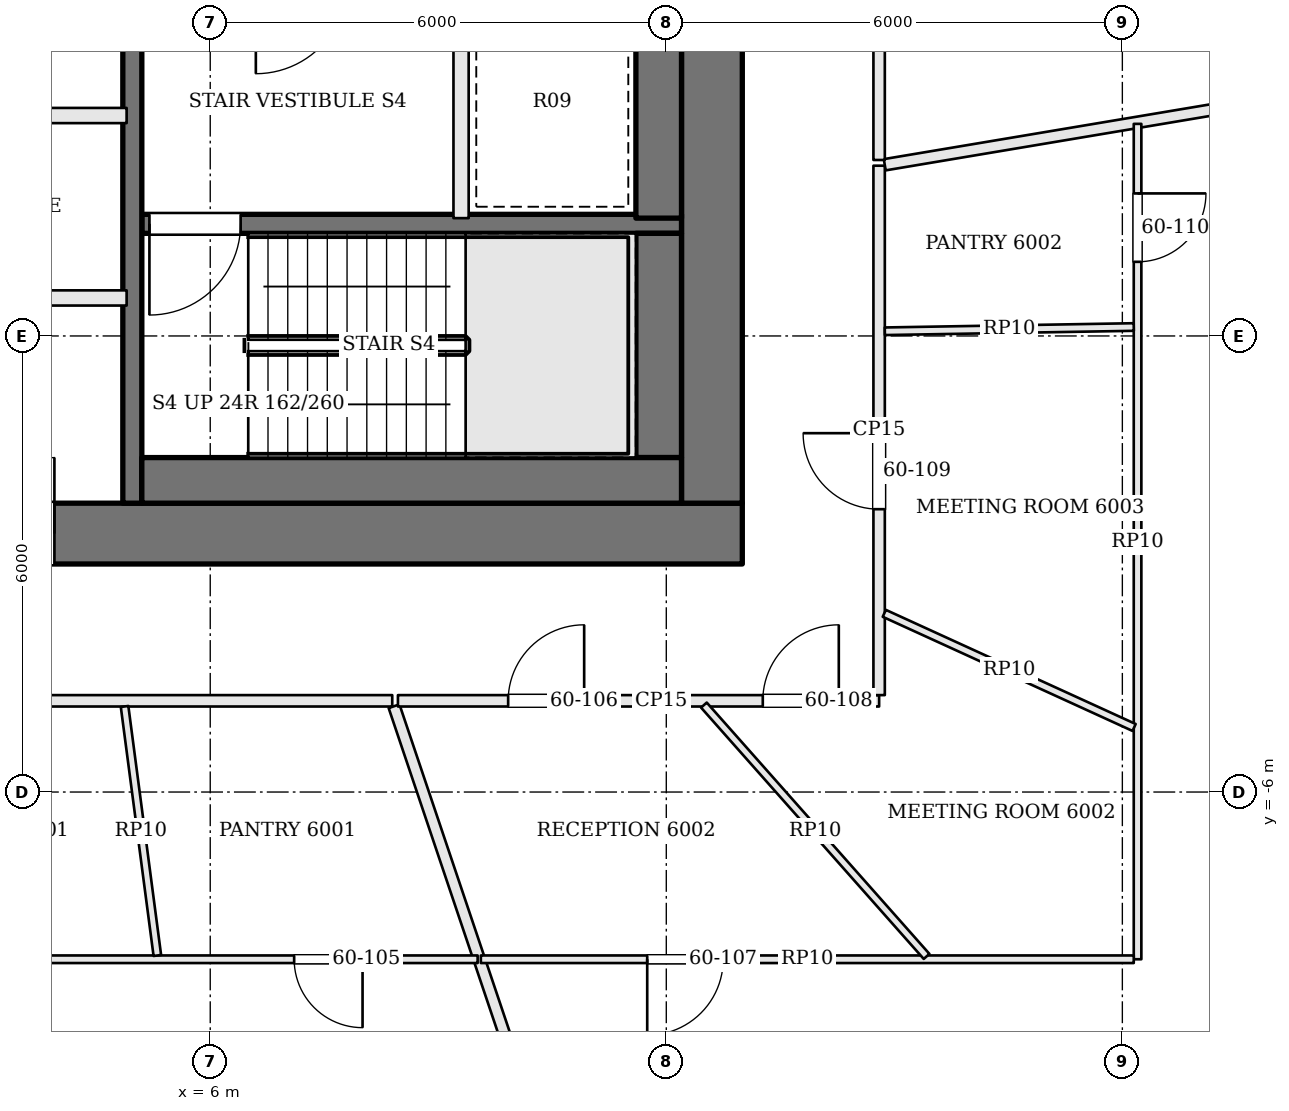
"""IFC4 building model, lengths in metres.
Left out: names, types, materials, properties, quantities, classifications, styles, units other than length and angle.
Written with IfcOpenShell. Run it as: python <this file> out.ifc"""

import sys

from ifc_helpers import new_model, si_unit, direction, frame, frame_2d, origin, place, context, subcontext, project, spatial, rectangle, extrude, element, fill, save


model = new_model("IFC4")
c1 = context("Model", 3, precision=1e-05, world=origin(), true_north=direction((0.0, 1.0)))
c2 = subcontext(c1, "Body", "Model", "MODEL_VIEW")
j1 = project(units=[si_unit("LENGTHUNIT", "METRE"), si_unit("PLANEANGLEUNIT", "RADIAN")], contexts=[c1])
p1 = place(None, origin())
s1 = spatial("IfcSite", under=j1, at=p1, CompositionType="ELEMENT")
p2 = place(p1, origin())
s2 = spatial("IfcBuilding", under=s1, at=p2, CompositionType="ELEMENT")
p3 = place(p2, frame((0.0, 0.0, 244.8)))
s3 = spatial("IfcBuildingStorey", under=s2, at=p3, CompositionType="ELEMENT", Elevation=244.8)
p4 = place(p3, frame((-13.0, -2.6, 0.0), z_axis=(0.0, 0.0, 1.0), x_axis=(1.0, 0.0, 0.0)))
e1 = element("IfcWall", 1, at=p4, inside=s3, PredefinedType="SHEAR", context=c2, shape_type="SweptSolid", body=[
    extrude(rectangle(XDim=26.0, YDim=0.8, at=frame_2d((13.0, 0.0))), origin(), (0.0, 0.0, 1.0), 3.9),
])
p5 = place(p4, frame((8.925, 0.0, 0.0)))
e2 = element("IfcOpeningElement", 2, at=p5, cuts=e1, PredefinedType="OPENING", context=c2, shape_type="SweptSolid", body=[
    extrude(rectangle(XDim=0.9, YDim=2.1, at=frame_2d((0.45, 1.05))), frame((0.0, 0.41, 0.0), z_axis=(0.0, -1.0, 0.0), x_axis=(1.0, 0.0, 0.0)), (0.0, 0.0, 1.0), 0.82),
])
p6 = place(p4, frame((11.475, 0.0, 0.0)))
e3 = element("IfcOpeningElement", 3, at=p6, cuts=e1, PredefinedType="OPENING", context=c2, shape_type="SweptSolid", body=[
    extrude(rectangle(XDim=0.9, YDim=2.1, at=frame_2d((0.45, 1.05))), frame((0.0, 0.41, 0.0), z_axis=(0.0, -1.0, 0.0), x_axis=(1.0, 0.0, 0.0)), (0.0, 0.0, 1.0), 0.82),
])
p7 = place(p4, frame((13.6, 0.0, 0.0)))
e4 = element("IfcOpeningElement", 4, at=p7, cuts=e1, PredefinedType="OPENING", context=c2, shape_type="SweptSolid", body=[
    extrude(rectangle(XDim=1.0, YDim=2.1, at=frame_2d((0.5, 1.05))), frame((0.0, 0.41, 0.0), z_axis=(0.0, -1.0, 0.0), x_axis=(1.0, 0.0, 0.0)), (0.0, 0.0, 1.0), 0.82),
])
p8 = place(p4, frame((15.95, 0.0, 0.0)))
e5 = element("IfcOpeningElement", 5, at=p8, cuts=e1, PredefinedType="OPENING", context=c2, shape_type="SweptSolid", body=[
    extrude(rectangle(XDim=1.0, YDim=2.1, at=frame_2d((0.5, 1.05))), frame((0.0, 0.41, 0.0), z_axis=(0.0, -1.0, 0.0), x_axis=(1.0, 0.0, 0.0)), (0.0, 0.0, 1.0), 0.82),
])
p9 = place(p3, frame((12.6, -2.2, 0.0), z_axis=(0.0, 0.0, 1.0), x_axis=(0.0, 1.0, 0.0)))
e6 = element("IfcWall", 6, at=p9, inside=s3, PredefinedType="SHEAR", context=c2, shape_type="SweptSolid", body=[
    extrude(rectangle(XDim=13.4, YDim=0.8, at=frame_2d((6.7, 0.0))), origin(), (0.0, 0.0, 1.0), 3.9),
])
p10 = place(p9, frame((7.4, 0.0, 0.0)))
e7 = element("IfcOpeningElement", 7, at=p10, cuts=e6, PredefinedType="OPENING", context=c2, shape_type="SweptSolid", body=[
    extrude(rectangle(XDim=1.8, YDim=2.1, at=frame_2d((0.9, 1.05))), frame((0.0, 0.41, 0.0), z_axis=(0.0, -1.0, 0.0), x_axis=(1.0, 0.0, 0.0)), (0.0, 0.0, 1.0), 0.82),
])
p11 = place(p3, frame((12.2, 1.475, 0.0), z_axis=(0.0, 0.0, 1.0), x_axis=(-1.0, 0.0, 0.0)))
e8 = element("IfcWall", 8, at=p11, inside=s3, PredefinedType="SOLIDWALL", context=c2, shape_type="SweptSolid", body=[
    extrude(rectangle(XDim=7.1, YDim=0.25, at=frame_2d((3.55, 0.0))), origin(), (0.0, 0.0, 1.0), 3.7),
])
p12 = place(p11, frame((5.8, 0.0, 0.0)))
e9 = element("IfcOpeningElement", 9, at=p12, cuts=e8, PredefinedType="OPENING", context=c2, shape_type="SweptSolid", body=[
    extrude(rectangle(XDim=1.2, YDim=2.1, at=frame_2d((0.6, 1.05))), frame((0.0, 0.135, 0.0), z_axis=(0.0, -1.0, 0.0), x_axis=(1.0, 0.0, 0.0)), (0.0, 0.0, 1.0), 0.27),
])
p13 = place(p3, frame((9.3, 4.55, 0.0), z_axis=(0.0, 0.0, 1.0), x_axis=(0.0, -1.0, 0.0)))
e10 = element("IfcWall", 10, at=p13, inside=s3, PredefinedType="SOLIDWALL", context=c2, shape_type="SweptSolid", body=[
    extrude(rectangle(XDim=3.0, YDim=0.2, at=frame_2d((1.5, 0.0))), origin(), (0.0, 0.0, 1.0), 3.7),
])
p14 = place(p3, frame((4.975, 11.2, 0.0), z_axis=(0.0, 0.0, 1.0), x_axis=(0.0, -1.0, 0.0)))
e11 = element("IfcWall", 11, at=p14, inside=s3, PredefinedType="SOLIDWALL", context=c2, shape_type="SweptSolid", body=[
    extrude(rectangle(XDim=13.4, YDim=0.25, at=frame_2d((6.7, 0.0))), origin(), (0.0, 0.0, 1.0), 3.7),
])
p15 = place(p14, frame((5.25, 0.0, 0.0)))
e12 = element("IfcOpeningElement", 12, at=p15, cuts=e11, PredefinedType="OPENING", context=c2, shape_type="SweptSolid", body=[
    extrude(rectangle(XDim=1.2, YDim=2.1, at=frame_2d((0.6, 1.05))), frame((0.0, 0.135, 0.0), z_axis=(0.0, -1.0, 0.0), x_axis=(1.0, 0.0, 0.0)), (0.0, 0.0, 1.0), 0.27),
])
p16 = place(p3, frame((11.9, 4.55, 0.0), z_axis=(0.0, 0.0, 1.0), x_axis=(0.0, -1.0, 0.0)))
e13 = element("IfcWall", 13, at=p16, inside=s3, PredefinedType="SOLIDWALL", context=c2, shape_type="SweptSolid", body=[
    extrude(rectangle(XDim=3.0, YDim=0.6, at=frame_2d((1.5, 0.0))), origin(), (0.0, 0.0, 1.0), 3.7),
])
p17 = place(p3, frame((11.9, 1.35, 0.0), z_axis=(0.0, 0.0, 1.0), x_axis=(0.0, -1.0, 0.0)))
e14 = element("IfcWall", 14, at=p17, inside=s3, PredefinedType="SOLIDWALL", context=c2, shape_type="SweptSolid", body=[
    extrude(rectangle(XDim=2.95, YDim=0.6, at=frame_2d((1.475, 0.0))), origin(), (0.0, 0.0, 1.0), 3.7),
])
p18 = place(p3, frame((12.2, -1.9, 0.0), z_axis=(0.0, 0.0, 1.0), x_axis=(-1.0, 0.0, 0.0)))
e15 = element("IfcWall", 15, at=p18, inside=s3, PredefinedType="SOLIDWALL", context=c2, shape_type="SweptSolid", body=[
    extrude(rectangle(XDim=7.1, YDim=0.6, at=frame_2d((3.55, 0.0))), origin(), (0.0, 0.0, 1.0), 3.7),
])
p19 = place(p3, frame((-4.9, 0.5, 0.0), z_axis=(0.0, 0.0, 1.0), x_axis=(1.0, 0.0, 0.0)))
e16 = element("IfcWall", 16, at=p19, inside=s3, PredefinedType="SOLIDWALL", context=c2, shape_type="SweptSolid", body=[
    extrude(rectangle(XDim=9.8, YDim=0.2, at=frame_2d((4.9, 0.0))), origin(), (0.0, 0.0, 1.0), 3.7),
])
p20 = place(p3, frame((-4.9, 2.9, 0.0), z_axis=(0.0, 0.0, 1.0), x_axis=(1.0, 0.0, 0.0)))
e17 = element("IfcWall", 17, at=p20, inside=s3, PredefinedType="SOLIDWALL", context=c2, shape_type="SweptSolid", body=[
    extrude(rectangle(XDim=9.8, YDim=0.2, at=frame_2d((4.9, 0.0))), origin(), (0.0, 0.0, 1.0), 3.7),
])
p21 = place(p20, frame((0.675, 0.0, 0.0)))
e18 = element("IfcOpeningElement", 18, at=p21, cuts=e17, PredefinedType="OPENING", context=c2, shape_type="SweptSolid", body=[
    extrude(rectangle(XDim=1.1, YDim=2.1, at=frame_2d((0.55, 1.05))), frame((0.0, 0.11, 0.0), z_axis=(0.0, -1.0, 0.0), x_axis=(1.0, 0.0, 0.0)), (0.0, 0.0, 1.0), 0.22),
])
p22 = place(p20, frame((2.613, 0.0, 0.0)))
e19 = element("IfcOpeningElement", 19, at=p22, cuts=e17, PredefinedType="OPENING", context=c2, shape_type="SweptSolid", body=[
    extrude(rectangle(XDim=0.9, YDim=2.1, at=frame_2d((0.45, 1.05))), frame((0.0, 0.11, 0.0), z_axis=(0.0, -1.0, 0.0), x_axis=(1.0, 0.0, 0.0)), (0.0, 0.0, 1.0), 0.22),
])
p23 = place(p20, frame((4.35, 0.0, 0.0)))
e20 = element("IfcOpeningElement", 20, at=p23, cuts=e17, PredefinedType="OPENING", context=c2, shape_type="SweptSolid", body=[
    extrude(rectangle(XDim=1.1, YDim=2.1, at=frame_2d((0.55, 1.05))), frame((0.0, 0.11, 0.0), z_axis=(0.0, -1.0, 0.0), x_axis=(1.0, 0.0, 0.0)), (0.0, 0.0, 1.0), 0.22),
])
p24 = place(p20, frame((7.463, 0.0, 0.0)))
e21 = element("IfcOpeningElement", 21, at=p24, cuts=e17, PredefinedType="OPENING", context=c2, shape_type="SweptSolid", body=[
    extrude(rectangle(XDim=1.0, YDim=2.1, at=frame_2d((0.5, 1.05))), frame((0.0, 0.11, 0.0), z_axis=(0.0, -1.0, 0.0), x_axis=(1.0, 0.0, 0.0)), (0.0, 0.0, 1.0), 0.22),
])
p25 = place(p3, frame((-4.664, -4.8, 0.0), z_axis=(0.0, 0.0, 1.0), x_axis=(1.0, 0.0, 0.0)))
e22 = element("IfcWall", 22, at=p25, inside=s3, PredefinedType="PARTITIONING", context=c2, shape_type="SweptSolid", body=[
    extrude(rectangle(XDim=13.058, YDim=0.15, at=frame_2d((6.529, 0.0))), origin(), (0.0, 0.0, 1.0), 3.084),
])
p26 = place(p25, frame((1.485, 0.0, 0.0)))
e23 = element("IfcOpeningElement", 23, at=p26, cuts=e22, PredefinedType="OPENING", context=c2, shape_type="SweptSolid", body=[
    extrude(rectangle(XDim=1.8, YDim=2.1, at=frame_2d((0.9, 1.05))), frame((0.0, 0.085, 0.0), z_axis=(0.0, -1.0, 0.0), x_axis=(1.0, 0.0, 0.0)), (0.0, 0.0, 1.0), 0.17),
])
p27 = place(p25, frame((6.686, 0.0, 0.0)))
e24 = element("IfcOpeningElement", 24, at=p27, cuts=e22, PredefinedType="OPENING", context=c2, shape_type="SweptSolid", body=[
    extrude(rectangle(XDim=1.0, YDim=2.4, at=frame_2d((0.5, 1.2))), frame((0.0, 0.085, 0.0), z_axis=(0.0, -1.0, 0.0), x_axis=(1.0, 0.0, 0.0)), (0.0, 0.0, 1.0), 0.17),
])
p28 = place(p3, frame((12.681, -17.533, 0.0), z_axis=(0.0, 0.0, 1.0), x_axis=(-0.319049570706, 0.947738028905, 0.0)))
e25 = element("IfcWall", 25, at=p28, inside=s3, PredefinedType="PARTITIONING", context=c2, shape_type="SweptSolid", body=[
    extrude(rectangle(XDim=13.361, YDim=0.15, at=frame_2d((6.68, 0.0))), origin(), (0.0, 0.0, 1.0), 3.084),
])
p29 = place(p3, frame((8.469, -4.8, 0.0), z_axis=(0.0, 0.0, 1.0), x_axis=(1.0, 0.0, 0.0)))
e26 = element("IfcWall", 26, at=p29, inside=s3, PredefinedType="PARTITIONING", context=c2, shape_type="SweptSolid", body=[
    extrude(rectangle(XDim=6.331, YDim=0.15, at=frame_2d((3.165, 0.0))), origin(), (0.0, 0.0, 1.0), 3.084),
])
p30 = place(p29, frame((1.45, 0.0, 0.0)))
e27 = element("IfcOpeningElement", 27, at=p30, cuts=e26, PredefinedType="OPENING", context=c2, shape_type="SweptSolid", body=[
    extrude(rectangle(XDim=1.0, YDim=2.1, at=frame_2d((0.5, 1.05))), frame((0.0, 0.085, 0.0), z_axis=(0.0, -1.0, 0.0), x_axis=(1.0, 0.0, 0.0)), (0.0, 0.0, 1.0), 0.17),
])
p31 = place(p29, frame((4.8, 0.0, 0.0)))
e28 = element("IfcOpeningElement", 28, at=p31, cuts=e26, PredefinedType="OPENING", context=c2, shape_type="SweptSolid", body=[
    extrude(rectangle(XDim=1.0, YDim=2.4, at=frame_2d((0.5, 1.2))), frame((0.0, 0.085, 0.0), z_axis=(0.0, -1.0, 0.0), x_axis=(1.0, 0.0, 0.0)), (0.0, 0.0, 1.0), 0.17),
])
p32 = place(p3, frame((14.8, -4.725, 0.0), z_axis=(0.0, 0.0, 1.0), x_axis=(0.0, 1.0, 0.0)))
e29 = element("IfcWall", 29, at=p32, inside=s3, PredefinedType="PARTITIONING", context=c2, shape_type="SweptSolid", body=[
    extrude(rectangle(XDim=6.965, YDim=0.15, at=frame_2d((3.482, 0.0))), origin(), (0.0, 0.0, 1.0), 3.084),
])
p33 = place(p32, frame((2.446, 0.0, 0.0)))
e30 = element("IfcOpeningElement", 30, at=p33, cuts=e29, PredefinedType="OPENING", context=c2, shape_type="SweptSolid", body=[
    extrude(rectangle(XDim=1.0, YDim=2.4, at=frame_2d((0.5, 1.2))), frame((0.0, 0.085, 0.0), z_axis=(0.0, -1.0, 0.0), x_axis=(1.0, 0.0, 0.0)), (0.0, 0.0, 1.0), 0.17),
])
p34 = place(p3, frame((28.982, 4.62, 0.0), z_axis=(0.0, 0.0, 1.0), x_axis=(-0.986213908907, -0.165475454008, 0.0)))
e31 = element("IfcWall", 31, at=p34, inside=s3, PredefinedType="PARTITIONING", context=c2, shape_type="SweptSolid", body=[
    extrude(rectangle(XDim=14.305, YDim=0.15, at=frame_2d((7.153, 0.0))), origin(), (0.0, 0.0, 1.0), 3.084),
])
p35 = place(p3, frame((14.8, 2.315, 0.0), z_axis=(0.0, 0.0, 1.0), x_axis=(0.0, 1.0, 0.0)))
e32 = element("IfcWall", 32, at=p35, inside=s3, PredefinedType="PARTITIONING", context=c2, shape_type="SweptSolid", body=[
    extrude(rectangle(XDim=11.485, YDim=0.15, at=frame_2d((5.742, 0.0))), origin(), (0.0, 0.0, 1.0), 3.084),
])
p36 = place(p35, frame((9.15, 0.0, 0.0)))
e33 = element("IfcOpeningElement", 33, at=p36, cuts=e32, PredefinedType="OPENING", context=c2, shape_type="SweptSolid", body=[
    extrude(rectangle(XDim=1.8, YDim=2.1, at=frame_2d((0.9, 1.05))), frame((0.0, 0.085, 0.0), z_axis=(0.0, -1.0, 0.0), x_axis=(1.0, 0.0, 0.0)), (0.0, 0.0, 1.0), 0.17),
])
p37 = place(p3, frame((9.518, -8.2, 0.0), z_axis=(0.0, 0.0, 1.0), x_axis=(-1.0, 0.0, 0.0)))
e34 = element("IfcWall", 34, at=p37, inside=s3, PredefinedType="PARTITIONING", context=c2, shape_type="SweptSolid", body=[
    extrude(rectangle(XDim=14.657, YDim=0.1, at=frame_2d((7.329, 0.0))), origin(), (0.0, 0.0, 1.0), 3.084),
])
p38 = place(p37, frame((11.435, 0.0, 0.0)))
e35 = element("IfcOpeningElement", 35, at=p38, cuts=e34, PredefinedType="OPENING", context=c2, shape_type="SweptSolid", body=[
    extrude(rectangle(XDim=1.0, YDim=2.1, at=frame_2d((0.5, 1.05))), frame((0.0, 0.06, 0.0), z_axis=(0.0, -1.0, 0.0), x_axis=(1.0, 0.0, 0.0)), (0.0, 0.0, 1.0), 0.12),
])
p39 = place(p37, frame((1.514, 0.0, 0.0)))
e36 = element("IfcOpeningElement", 36, at=p39, cuts=e34, PredefinedType="OPENING", context=c2, shape_type="SweptSolid", body=[
    extrude(rectangle(XDim=0.9, YDim=2.1, at=frame_2d((0.45, 1.05))), frame((0.0, 0.06, 0.0), z_axis=(0.0, -1.0, 0.0), x_axis=(1.0, 0.0, 0.0)), (0.0, 0.0, 1.0), 0.12),
])
p40 = place(p3, frame((4.873, -4.875, 0.0), z_axis=(0.0, 0.0, 1.0), x_axis=(0.13048891715, -0.991449768017, 0.0)))
e37 = element("IfcWall", 37, at=p40, inside=s3, PredefinedType="PARTITIONING", context=c2, shape_type="SweptSolid", body=[
    extrude(rectangle(XDim=3.304, YDim=0.1, at=frame_2d((1.652, 0.0))), origin(), (0.0, 0.0, 1.0), 3.084),
])
p41 = place(p3, frame((18.2, 2.79, 0.0), z_axis=(0.0, 0.0, 1.0), x_axis=(0.0, -1.0, 0.0)))
e38 = element("IfcWall", 38, at=p41, inside=s3, PredefinedType="PARTITIONING", context=c2, shape_type="SweptSolid", body=[
    extrude(rectangle(XDim=10.99, YDim=0.1, at=frame_2d((5.495, 0.0))), origin(), (0.0, 0.0, 1.0), 3.084),
])
p42 = place(p41, frame((0.915, 0.0, 0.0)))
e39 = element("IfcOpeningElement", 39, at=p42, cuts=e38, PredefinedType="OPENING", context=c2, shape_type="SweptSolid", body=[
    extrude(rectangle(XDim=0.9, YDim=2.1, at=frame_2d((0.45, 1.05))), frame((0.0, 0.06, 0.0), z_axis=(0.0, -1.0, 0.0), x_axis=(1.0, 0.0, 0.0)), (0.0, 0.0, 1.0), 0.12),
])
p43 = place(p3, frame((18.15, -8.2, 0.0), z_axis=(0.0, 0.0, 1.0), x_axis=(-1.0, 0.0, 0.0)))
e40 = element("IfcWall", 40, at=p43, inside=s3, PredefinedType="PARTITIONING", context=c2, shape_type="SweptSolid", body=[
    extrude(rectangle(XDim=8.59, YDim=0.1, at=frame_2d((4.295, 0.0))), origin(), (0.0, 0.0, 1.0), 3.084),
])
p44 = place(p43, frame((5.401, 0.0, 0.0)))
e41 = element("IfcOpeningElement", 41, at=p44, cuts=e40, PredefinedType="OPENING", context=c2, shape_type="SweptSolid", body=[
    extrude(rectangle(XDim=1.0, YDim=2.1, at=frame_2d((0.5, 1.05))), frame((0.0, 0.06, 0.0), z_axis=(0.0, -1.0, 0.0), x_axis=(1.0, 0.0, 0.0)), (0.0, 0.0, 1.0), 0.12),
])
p45 = place(p3, frame((12.495, -4.856, 0.0), z_axis=(0.0, 0.0, 1.0), x_axis=(0.663152041806, -0.748484715574, 0.0)))
e42 = element("IfcWall", 42, at=p45, inside=s3, PredefinedType="PARTITIONING", context=c2, shape_type="SweptSolid", body=[
    extrude(rectangle(XDim=4.417, YDim=0.1, at=frame_2d((2.209, 0.0))), origin(), (0.0, 0.0, 1.0), 3.084),
])
p46 = place(p3, frame((14.868, -3.649, 0.0), z_axis=(0.0, 0.0, 1.0), x_axis=(0.909566433152, -0.41555854423, 0.0)))
e43 = element("IfcWall", 43, at=p46, inside=s3, PredefinedType="PARTITIONING", context=c2, shape_type="SweptSolid", body=[
    extrude(rectangle(XDim=3.613, YDim=0.1, at=frame_2d((1.807, 0.0))), origin(), (0.0, 0.0, 1.0), 3.084),
])
p47 = place(p3, frame((14.875, 0.062, 0.0), z_axis=(0.0, 0.0, 1.0), x_axis=(0.999854310099, 0.017069228941, 0.0)))
e44 = element("IfcWall", 44, at=p47, inside=s3, PredefinedType="PARTITIONING", context=c2, shape_type="SweptSolid", body=[
    extrude(rectangle(XDim=3.275, YDim=0.1, at=frame_2d((1.638, 0.0))), origin(), (0.0, 0.0, 1.0), 3.084),
])
p48 = place(p12, origin())
e45 = element("IfcDoor", 45, at=p48, inside=s3, OperationType="SINGLE_SWING_RIGHT", PredefinedType="DOOR", context=c2, shape_type="SweptSolid", body=[
    extrude(rectangle(XDim=1.2, YDim=2.1, at=frame_2d((0.6, 1.05))), frame((0.0, 0.025, 0.0), z_axis=(0.0, -1.0, 0.0), x_axis=(1.0, 0.0, 0.0)), (0.0, 0.0, 1.0), 0.05),
])
fill(e9, e45)
p49 = place(p8, origin())
e46 = element("IfcDoor", 46, at=p49, inside=s3, OperationType="SINGLE_SWING_RIGHT", PredefinedType="DOOR", context=c2, shape_type="SweptSolid", body=[
    extrude(rectangle(XDim=1.0, YDim=2.1, at=frame_2d((0.5, 1.05))), frame((0.0, 0.025, 0.0), z_axis=(0.0, -1.0, 0.0), x_axis=(1.0, 0.0, 0.0)), (0.0, 0.0, 1.0), 0.05),
])
fill(e5, e46)
p50 = place(p39, origin())
e47 = element("IfcDoor", 47, at=p50, inside=s3, OperationType="SINGLE_SWING_LEFT", PredefinedType="DOOR", context=c2, shape_type="SweptSolid", body=[
    extrude(rectangle(XDim=0.9, YDim=2.1, at=frame_2d((0.45, 1.05))), frame((0.0, 0.025, 0.0), z_axis=(0.0, -1.0, 0.0), x_axis=(1.0, 0.0, 0.0)), (0.0, 0.0, 1.0), 0.05),
])
fill(e36, e47)
p51 = place(p30, origin())
e48 = element("IfcDoor", 48, at=p51, inside=s3, OperationType="SINGLE_SWING_RIGHT", PredefinedType="DOOR", context=c2, shape_type="SweptSolid", body=[
    extrude(rectangle(XDim=1.0, YDim=2.1, at=frame_2d((0.5, 1.05))), frame((0.0, 0.025, 0.0), z_axis=(0.0, -1.0, 0.0), x_axis=(1.0, 0.0, 0.0)), (0.0, 0.0, 1.0), 0.05),
])
fill(e27, e48)
p52 = place(p44, origin())
e49 = element("IfcDoor", 49, at=p52, inside=s3, OperationType="SINGLE_SWING_RIGHT", PredefinedType="DOOR", context=c2, shape_type="SweptSolid", body=[
    extrude(rectangle(XDim=1.0, YDim=2.1, at=frame_2d((0.5, 1.05))), frame((0.0, 0.025, 0.0), z_axis=(0.0, -1.0, 0.0), x_axis=(1.0, 0.0, 0.0)), (0.0, 0.0, 1.0), 0.05),
])
fill(e41, e49)
p53 = place(p31, origin())
e50 = element("IfcDoor", 50, at=p53, inside=s3, OperationType="SINGLE_SWING_RIGHT", PredefinedType="DOOR", context=c2, shape_type="SweptSolid", body=[
    extrude(rectangle(XDim=1.0, YDim=2.4, at=frame_2d((0.5, 1.2))), frame((0.0, 0.025, 0.0), z_axis=(0.0, -1.0, 0.0), x_axis=(1.0, 0.0, 0.0)), (0.0, 0.0, 1.0), 0.05),
])
fill(e28, e50)
p54 = place(p33, origin())
e51 = element("IfcDoor", 51, at=p54, inside=s3, OperationType="SINGLE_SWING_RIGHT", PredefinedType="DOOR", context=c2, shape_type="SweptSolid", body=[
    extrude(rectangle(XDim=1.0, YDim=2.4, at=frame_2d((0.5, 1.2))), frame((0.0, 0.025, 0.0), z_axis=(0.0, -1.0, 0.0), x_axis=(1.0, 0.0, 0.0)), (0.0, 0.0, 1.0), 0.05),
])
fill(e30, e51)
p55 = place(p42, origin())
e52 = element("IfcDoor", 52, at=p55, inside=s3, OperationType="SINGLE_SWING_LEFT", PredefinedType="DOOR", context=c2, shape_type="SweptSolid", body=[
    extrude(rectangle(XDim=0.9, YDim=2.1, at=frame_2d((0.45, 1.05))), frame((0.0, 0.025, 0.0), z_axis=(0.0, -1.0, 0.0), x_axis=(1.0, 0.0, 0.0)), (0.0, 0.0, 1.0), 0.05),
])
fill(e39, e52)
save(model, sys.argv[1])
